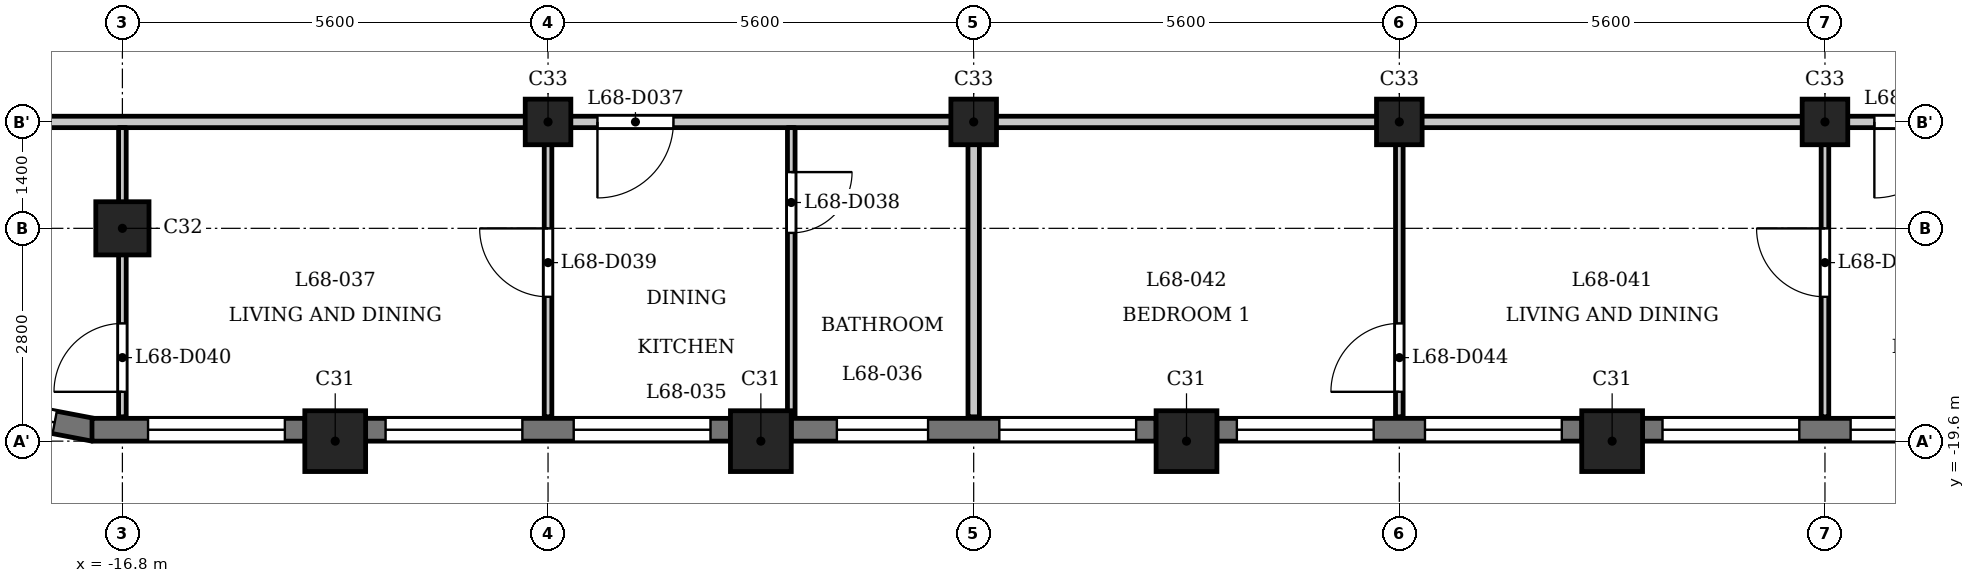
"""IFC4 building model, lengths in metres.
Left out: names, types, materials, properties, quantities, classifications, styles, units other than length and angle.
Written with IfcOpenShell. Run it as: python <this file> out.ifc"""

import sys

from ifc_helpers import new_model, si_unit, direction, frame, frame_2d, origin, origin_2d, place, context, subcontext, project, spatial, rectangle, extrude, element, fill, save


model = new_model("IFC4")
c1 = context("Model", 3, precision=1e-05, world=origin(), true_north=direction((0.0, 1.0)))
c2 = subcontext(c1, "Body", "Model", "MODEL_VIEW")
j1 = project(units=[si_unit("LENGTHUNIT", "METRE"), si_unit("PLANEANGLEUNIT", "RADIAN")], contexts=[c1])
p1 = place(None, origin())
s1 = spatial("IfcSite", under=j1, at=p1, CompositionType="ELEMENT")
p2 = place(p1, origin())
s2 = spatial("IfcBuilding", under=s1, at=p2, CompositionType="ELEMENT")
p3 = place(p2, frame((0.0, 0.0, 262.7)))
s3 = spatial("IfcBuildingStorey", under=s2, at=p3, CompositionType="ELEMENT", Elevation=262.7)
for number, where, z_axis, x_axis in (
    (1, (-14.0, -19.6, 0.0), (0.0, 0.0, 1.0), (1.0, 0.0, 0.0)),
    (2, (-8.4, -19.6, 0.0), (0.0, 0.0, 1.0), (1.0, 0.0, 0.0)),
    (3, (-2.8, -19.6, 0.0), (0.0, 0.0, 1.0), (1.0, 0.0, 0.0)),
    (4, (2.8, -19.6, 0.0), (0.0, 0.0, 1.0), (1.0, 0.0, 0.0)),
):
    element("IfcColumn", number, at=place(p3, frame(where, z_axis=z_axis, x_axis=x_axis)), inside=s3, PredefinedType="COLUMN", context=c2, shape_type="SweptSolid", body=[
        extrude(rectangle(XDim=0.8, YDim=0.8, at=origin_2d()), origin(), (0.0, 0.0, 1.0), 3.5),
    ])
p4 = place(p3, frame((-16.8, -16.8, 0.0), z_axis=(0.0, 0.0, 1.0), x_axis=(1.0, 0.0, 0.0)))
e5 = element("IfcColumn", 5, at=p4, inside=s3, PredefinedType="COLUMN", context=c2, shape_type="SweptSolid", body=[
    extrude(rectangle(XDim=0.7, YDim=0.7, at=origin_2d()), origin(), (0.0, 0.0, 1.0), 3.5),
])
for number, where, z_axis, x_axis in (
    (6, (-11.2, -15.4, 0.0), (0.0, 0.0, 1.0), (1.0, 0.0, 0.0)),
    (7, (-5.6, -15.4, 0.0), (0.0, 0.0, 1.0), (1.0, 0.0, 0.0)),
    (8, (0.0, -15.4, 0.0), (0.0, 0.0, 1.0), (1.0, 0.0, 0.0)),
    (9, (5.6, -15.4, 0.0), (0.0, 0.0, 1.0), (1.0, 0.0, 0.0)),
):
    element("IfcColumn", number, at=place(p3, frame(where, z_axis=z_axis, x_axis=x_axis)), inside=s3, PredefinedType="COLUMN", context=c2, shape_type="SweptSolid", body=[
        extrude(rectangle(XDim=0.6, YDim=0.6, at=origin_2d()), origin(), (0.0, 0.0, 1.0), 3.5),
    ])
p5 = place(p3, frame((-18.995, -19.105, 0.0), z_axis=(0.0, 0.0, 1.0), x_axis=(0.982301706131, -0.187305520826, 0.0)))
e10 = element("IfcWall", 10, at=p5, inside=s3, PredefinedType="SOLIDWALL", context=c2, shape_type="SweptSolid", body=[
    extrude(rectangle(XDim=1.856, YDim=0.3, at=frame_2d((0.928, 0.0))), origin(), (0.0, 0.0, 1.0), 2.55),
])
p6 = place(p5, frame((0.528, 0.0, 0.6)))
e11 = element("IfcOpeningElement", 11, at=p6, cuts=e10, PredefinedType="OPENING", context=c2, shape_type="SweptSolid", body=[
    extrude(rectangle(XDim=0.8, YDim=1.55, at=frame_2d((0.4, 0.775))), frame((0.0, 0.16, 0.0), z_axis=(0.0, -1.0, 0.0), x_axis=(1.0, 0.0, 0.0)), (0.0, 0.0, 1.0), 0.32),
])
p7 = place(p3, frame((-17.2, -19.45, 0.0), z_axis=(0.0, 0.0, 1.0), x_axis=(1.0, 0.0, 0.0)))
e12 = element("IfcWall", 12, at=p7, inside=s3, PredefinedType="SOLIDWALL", context=c2, shape_type="SweptSolid", body=[
    extrude(rectangle(XDim=2.8, YDim=0.3, at=frame_2d((1.4, 0.0))), origin(), (0.0, 0.0, 1.0), 2.55),
])
p8 = place(p7, frame((0.738, 0.0, 0.9)))
e13 = element("IfcOpeningElement", 13, at=p8, cuts=e12, PredefinedType="OPENING", context=c2, shape_type="SweptSolid", body=[
    extrude(rectangle(XDim=1.8, YDim=1.25, at=frame_2d((0.9, 0.625))), frame((0.0, 0.16, 0.0), z_axis=(0.0, -1.0, 0.0), x_axis=(1.0, 0.0, 0.0)), (0.0, 0.0, 1.0), 0.32),
])
p9 = place(p3, frame((-13.6, -19.45, 0.0), z_axis=(0.0, 0.0, 1.0), x_axis=(1.0, 0.0, 0.0)))
e14 = element("IfcWall", 14, at=p9, inside=s3, PredefinedType="SOLIDWALL", context=c2, shape_type="SweptSolid", body=[
    extrude(rectangle(XDim=4.8, YDim=0.3, at=frame_2d((2.4, 0.0))), origin(), (0.0, 0.0, 1.0), 2.55),
])
p10 = place(p9, frame((0.262, 0.0, 0.9)))
e15 = element("IfcOpeningElement", 15, at=p10, cuts=e14, PredefinedType="OPENING", context=c2, shape_type="SweptSolid", body=[
    extrude(rectangle(XDim=1.8, YDim=1.25, at=frame_2d((0.9, 0.625))), frame((0.0, 0.16, 0.0), z_axis=(0.0, -1.0, 0.0), x_axis=(1.0, 0.0, 0.0)), (0.0, 0.0, 1.0), 0.32),
])
p11 = place(p9, frame((2.738, 0.0, 0.9)))
e16 = element("IfcOpeningElement", 16, at=p11, cuts=e14, PredefinedType="OPENING", context=c2, shape_type="SweptSolid", body=[
    extrude(rectangle(XDim=1.8, YDim=1.25, at=frame_2d((0.9, 0.625))), frame((0.0, 0.16, 0.0), z_axis=(0.0, -1.0, 0.0), x_axis=(1.0, 0.0, 0.0)), (0.0, 0.0, 1.0), 0.32),
])
p12 = place(p3, frame((-8.0, -19.45, 0.0), z_axis=(0.0, 0.0, 1.0), x_axis=(1.0, 0.0, 0.0)))
e17 = element("IfcWall", 17, at=p12, inside=s3, PredefinedType="SOLIDWALL", context=c2, shape_type="SweptSolid", body=[
    extrude(rectangle(XDim=4.8, YDim=0.3, at=frame_2d((2.4, 0.0))), origin(), (0.0, 0.0, 1.0), 2.55),
])
p13 = place(p12, frame((0.6, 0.0, 0.6)))
e18 = element("IfcOpeningElement", 18, at=p13, cuts=e17, PredefinedType="OPENING", context=c2, shape_type="SweptSolid", body=[
    extrude(rectangle(XDim=1.2, YDim=1.55, at=frame_2d((0.6, 0.775))), frame((0.0, 0.16, 0.0), z_axis=(0.0, -1.0, 0.0), x_axis=(1.0, 0.0, 0.0)), (0.0, 0.0, 1.0), 0.32),
])
p14 = place(p12, frame((2.738, 0.0, 0.9)))
e19 = element("IfcOpeningElement", 19, at=p14, cuts=e17, PredefinedType="OPENING", context=c2, shape_type="SweptSolid", body=[
    extrude(rectangle(XDim=1.8, YDim=1.25, at=frame_2d((0.9, 0.625))), frame((0.0, 0.16, 0.0), z_axis=(0.0, -1.0, 0.0), x_axis=(1.0, 0.0, 0.0)), (0.0, 0.0, 1.0), 0.32),
])
p15 = place(p3, frame((-2.4, -19.45, 0.0), z_axis=(0.0, 0.0, 1.0), x_axis=(1.0, 0.0, 0.0)))
e20 = element("IfcWall", 20, at=p15, inside=s3, PredefinedType="SOLIDWALL", context=c2, shape_type="SweptSolid", body=[
    extrude(rectangle(XDim=4.8, YDim=0.3, at=frame_2d((2.4, 0.0))), origin(), (0.0, 0.0, 1.0), 2.55),
])
p16 = place(p15, frame((0.262, 0.0, 0.9)))
e21 = element("IfcOpeningElement", 21, at=p16, cuts=e20, PredefinedType="OPENING", context=c2, shape_type="SweptSolid", body=[
    extrude(rectangle(XDim=1.8, YDim=1.25, at=frame_2d((0.9, 0.625))), frame((0.0, 0.16, 0.0), z_axis=(0.0, -1.0, 0.0), x_axis=(1.0, 0.0, 0.0)), (0.0, 0.0, 1.0), 0.32),
])
p17 = place(p15, frame((2.738, 0.0, 0.9)))
e22 = element("IfcOpeningElement", 22, at=p17, cuts=e20, PredefinedType="OPENING", context=c2, shape_type="SweptSolid", body=[
    extrude(rectangle(XDim=1.8, YDim=1.25, at=frame_2d((0.9, 0.625))), frame((0.0, 0.16, 0.0), z_axis=(0.0, -1.0, 0.0), x_axis=(1.0, 0.0, 0.0)), (0.0, 0.0, 1.0), 0.32),
])
p18 = place(p3, frame((3.2, -19.45, 0.0), z_axis=(0.0, 0.0, 1.0), x_axis=(1.0, 0.0, 0.0)))
e23 = element("IfcWall", 23, at=p18, inside=s3, PredefinedType="SOLIDWALL", context=c2, shape_type="SweptSolid", body=[
    extrude(rectangle(XDim=4.8, YDim=0.3, at=frame_2d((2.4, 0.0))), origin(), (0.0, 0.0, 1.0), 2.55),
])
p19 = place(p18, frame((0.262, 0.0, 0.9)))
e24 = element("IfcOpeningElement", 24, at=p19, cuts=e23, PredefinedType="OPENING", context=c2, shape_type="SweptSolid", body=[
    extrude(rectangle(XDim=1.8, YDim=1.25, at=frame_2d((0.9, 0.625))), frame((0.0, 0.16, 0.0), z_axis=(0.0, -1.0, 0.0), x_axis=(1.0, 0.0, 0.0)), (0.0, 0.0, 1.0), 0.32),
])
p20 = place(p18, frame((2.738, 0.0, 0.9)))
e25 = element("IfcOpeningElement", 25, at=p20, cuts=e23, PredefinedType="OPENING", context=c2, shape_type="SweptSolid", body=[
    extrude(rectangle(XDim=1.8, YDim=1.25, at=frame_2d((0.9, 0.625))), frame((0.0, 0.16, 0.0), z_axis=(0.0, -1.0, 0.0), x_axis=(1.0, 0.0, 0.0)), (0.0, 0.0, 1.0), 0.32),
])
p21 = place(p3, frame((-23.322, -15.4, 0.0), z_axis=(0.0, 0.0, 1.0), x_axis=(1.0, 0.0, 0.0)))
e26 = element("IfcWall", 26, at=p21, inside=s3, PredefinedType="PARTITIONING", context=c2, shape_type="SweptSolid", body=[
    extrude(rectangle(XDim=46.872, YDim=0.15, at=frame_2d((23.436, 0.0))), origin(), (0.0, 0.0, 1.0), 3.2),
])
p22 = place(p21, frame((12.772, 0.0, 0.0)))
e27 = element("IfcOpeningElement", 27, at=p22, cuts=e26, PredefinedType="OPENING", context=c2, shape_type="SweptSolid", body=[
    extrude(rectangle(XDim=1.0, YDim=2.1, at=frame_2d((0.5, 1.05))), frame((0.0, 0.085, 0.0), z_axis=(0.0, -1.0, 0.0), x_axis=(1.0, 0.0, 0.0)), (0.0, 0.0, 1.0), 0.17),
])
p23 = place(p21, frame((29.572, 0.0, 0.0)))
e28 = element("IfcOpeningElement", 28, at=p23, cuts=e26, PredefinedType="OPENING", context=c2, shape_type="SweptSolid", body=[
    extrude(rectangle(XDim=1.0, YDim=2.1, at=frame_2d((0.5, 1.05))), frame((0.0, 0.085, 0.0), z_axis=(0.0, -1.0, 0.0), x_axis=(1.0, 0.0, 0.0)), (0.0, 0.0, 1.0), 0.17),
])
p24 = place(p21, frame((37.572, 0.0, 0.0)))
e29 = element("IfcOpeningElement", 29, at=p24, cuts=e26, PredefinedType="OPENING", context=c2, shape_type="SweptSolid", body=[
    extrude(rectangle(XDim=1.0, YDim=2.1, at=frame_2d((0.5, 1.05))), frame((0.0, 0.085, 0.0), z_axis=(0.0, -1.0, 0.0), x_axis=(1.0, 0.0, 0.0)), (0.0, 0.0, 1.0), 0.17),
])
p25 = place(p3, frame((-16.8, -19.28, 0.0), z_axis=(0.0, 0.0, 1.0), x_axis=(0.0, 1.0, 0.0)))
e30 = element("IfcWall", 30, at=p25, inside=s3, PredefinedType="PARTITIONING", context=c2, shape_type="SweptSolid", body=[
    extrude(rectangle(XDim=3.805, YDim=0.1, at=frame_2d((1.902, 0.0))), origin(), (0.0, 0.0, 1.0), 3.2),
])
p26 = place(p25, frame((0.329, 0.0, 0.0)))
e31 = element("IfcOpeningElement", 31, at=p26, cuts=e30, PredefinedType="OPENING", context=c2, shape_type="SweptSolid", body=[
    extrude(rectangle(XDim=0.9, YDim=2.1, at=frame_2d((0.45, 1.05))), frame((0.0, 0.06, 0.0), z_axis=(0.0, -1.0, 0.0), x_axis=(1.0, 0.0, 0.0)), (0.0, 0.0, 1.0), 0.12),
])
p27 = place(p3, frame((-11.2, -19.28, 0.0), z_axis=(0.0, 0.0, 1.0), x_axis=(0.0, 1.0, 0.0)))
e32 = element("IfcWall", 32, at=p27, inside=s3, PredefinedType="PARTITIONING", context=c2, shape_type="SweptSolid", body=[
    extrude(rectangle(XDim=3.805, YDim=0.1, at=frame_2d((1.902, 0.0))), origin(), (0.0, 0.0, 1.0), 3.2),
])
p28 = place(p27, frame((1.579, 0.0, 0.0)))
e33 = element("IfcOpeningElement", 33, at=p28, cuts=e32, PredefinedType="OPENING", context=c2, shape_type="SweptSolid", body=[
    extrude(rectangle(XDim=0.9, YDim=2.1, at=frame_2d((0.45, 1.05))), frame((0.0, 0.06, 0.0), z_axis=(0.0, -1.0, 0.0), x_axis=(1.0, 0.0, 0.0)), (0.0, 0.0, 1.0), 0.12),
])
p29 = place(p3, frame((-8.0, -19.28, 0.0), z_axis=(0.0, 0.0, 1.0), x_axis=(0.0, 1.0, 0.0)))
e34 = element("IfcWall", 34, at=p29, inside=s3, PredefinedType="PARTITIONING", context=c2, shape_type="SweptSolid", body=[
    extrude(rectangle(XDim=3.805, YDim=0.1, at=frame_2d((1.902, 0.0))), origin(), (0.0, 0.0, 1.0), 3.2),
])
p30 = place(p29, frame((2.42, 0.0, 0.0)))
e35 = element("IfcOpeningElement", 35, at=p30, cuts=e34, PredefinedType="OPENING", context=c2, shape_type="SweptSolid", body=[
    extrude(rectangle(XDim=0.8, YDim=2.1, at=frame_2d((0.4, 1.05))), frame((0.0, 0.06, 0.0), z_axis=(0.0, -1.0, 0.0), x_axis=(1.0, 0.0, 0.0)), (0.0, 0.0, 1.0), 0.12),
])
p31 = place(p3, frame((-5.6, -19.28, 0.0), z_axis=(0.0, 0.0, 1.0), x_axis=(0.0, 1.0, 0.0)))
e36 = element("IfcWall", 36, at=p31, inside=s3, PredefinedType="PARTITIONING", context=c2, shape_type="SweptSolid", body=[
    extrude(rectangle(XDim=3.805, YDim=0.15, at=frame_2d((1.902, 0.0))), origin(), (0.0, 0.0, 1.0), 3.2),
])
p32 = place(p3, frame((0.0, -19.28, 0.0), z_axis=(0.0, 0.0, 1.0), x_axis=(0.0, 1.0, 0.0)))
e37 = element("IfcWall", 37, at=p32, inside=s3, PredefinedType="PARTITIONING", context=c2, shape_type="SweptSolid", body=[
    extrude(rectangle(XDim=3.805, YDim=0.1, at=frame_2d((1.902, 0.0))), origin(), (0.0, 0.0, 1.0), 3.2),
])
p33 = place(p32, frame((0.329, 0.0, 0.0)))
e38 = element("IfcOpeningElement", 38, at=p33, cuts=e37, PredefinedType="OPENING", context=c2, shape_type="SweptSolid", body=[
    extrude(rectangle(XDim=0.9, YDim=2.1, at=frame_2d((0.45, 1.05))), frame((0.0, 0.06, 0.0), z_axis=(0.0, -1.0, 0.0), x_axis=(1.0, 0.0, 0.0)), (0.0, 0.0, 1.0), 0.12),
])
p34 = place(p3, frame((5.6, -19.28, 0.0), z_axis=(0.0, 0.0, 1.0), x_axis=(0.0, 1.0, 0.0)))
e39 = element("IfcWall", 39, at=p34, inside=s3, PredefinedType="PARTITIONING", context=c2, shape_type="SweptSolid", body=[
    extrude(rectangle(XDim=3.805, YDim=0.1, at=frame_2d((1.902, 0.0))), origin(), (0.0, 0.0, 1.0), 3.2),
])
p35 = place(p34, frame((1.579, 0.0, 0.0)))
e40 = element("IfcOpeningElement", 40, at=p35, cuts=e39, PredefinedType="OPENING", context=c2, shape_type="SweptSolid", body=[
    extrude(rectangle(XDim=0.9, YDim=2.1, at=frame_2d((0.45, 1.05))), frame((0.0, 0.06, 0.0), z_axis=(0.0, -1.0, 0.0), x_axis=(1.0, 0.0, 0.0)), (0.0, 0.0, 1.0), 0.12),
])
p36 = place(p22, origin())
e41 = element("IfcDoor", 41, at=p36, inside=s3, OperationType="SINGLE_SWING_LEFT", PredefinedType="DOOR", context=c2, shape_type="SweptSolid", body=[
    extrude(rectangle(XDim=1.0, YDim=2.1, at=frame_2d((0.5, 1.05))), frame((0.0, 0.025, 0.0), z_axis=(0.0, -1.0, 0.0), x_axis=(1.0, 0.0, 0.0)), (0.0, 0.0, 1.0), 0.05),
])
fill(e27, e41)
p37 = place(p30, origin())
e42 = element("IfcDoor", 42, at=p37, inside=s3, OperationType="SINGLE_SWING_RIGHT", PredefinedType="DOOR", context=c2, shape_type="SweptSolid", body=[
    extrude(rectangle(XDim=0.8, YDim=2.1, at=frame_2d((0.4, 1.05))), frame((0.0, 0.025, 0.0), z_axis=(0.0, -1.0, 0.0), x_axis=(1.0, 0.0, 0.0)), (0.0, 0.0, 1.0), 0.05),
])
fill(e35, e42)
p38 = place(p28, origin())
e43 = element("IfcDoor", 43, at=p38, inside=s3, OperationType="SINGLE_SWING_LEFT", PredefinedType="DOOR", context=c2, shape_type="SweptSolid", body=[
    extrude(rectangle(XDim=0.9, YDim=2.1, at=frame_2d((0.45, 1.05))), frame((0.0, 0.025, 0.0), z_axis=(0.0, -1.0, 0.0), x_axis=(1.0, 0.0, 0.0)), (0.0, 0.0, 1.0), 0.05),
])
fill(e33, e43)
p39 = place(p26, origin())
e44 = element("IfcDoor", 44, at=p39, inside=s3, OperationType="SINGLE_SWING_RIGHT", PredefinedType="DOOR", context=c2, shape_type="SweptSolid", body=[
    extrude(rectangle(XDim=0.9, YDim=2.1, at=frame_2d((0.45, 1.05))), frame((0.0, 0.025, 0.0), z_axis=(0.0, -1.0, 0.0), x_axis=(1.0, 0.0, 0.0)), (0.0, 0.0, 1.0), 0.05),
])
fill(e31, e44)
p40 = place(p23, origin())
e45 = element("IfcDoor", 45, at=p40, inside=s3, OperationType="SINGLE_SWING_LEFT", PredefinedType="DOOR", context=c2, shape_type="SweptSolid", body=[
    extrude(rectangle(XDim=1.0, YDim=2.1, at=frame_2d((0.5, 1.05))), frame((0.0, 0.025, 0.0), z_axis=(0.0, -1.0, 0.0), x_axis=(1.0, 0.0, 0.0)), (0.0, 0.0, 1.0), 0.05),
])
fill(e28, e45)
p41 = place(p35, origin())
e46 = element("IfcDoor", 46, at=p41, inside=s3, OperationType="SINGLE_SWING_LEFT", PredefinedType="DOOR", context=c2, shape_type="SweptSolid", body=[
    extrude(rectangle(XDim=0.9, YDim=2.1, at=frame_2d((0.45, 1.05))), frame((0.0, 0.025, 0.0), z_axis=(0.0, -1.0, 0.0), x_axis=(1.0, 0.0, 0.0)), (0.0, 0.0, 1.0), 0.05),
])
fill(e40, e46)
p42 = place(p33, origin())
e47 = element("IfcDoor", 47, at=p42, inside=s3, OperationType="SINGLE_SWING_RIGHT", PredefinedType="DOOR", context=c2, shape_type="SweptSolid", body=[
    extrude(rectangle(XDim=0.9, YDim=2.1, at=frame_2d((0.45, 1.05))), frame((0.0, 0.025, 0.0), z_axis=(0.0, -1.0, 0.0), x_axis=(1.0, 0.0, 0.0)), (0.0, 0.0, 1.0), 0.05),
])
fill(e38, e47)
p43 = place(p6, origin())
e48 = element("IfcWindow", 48, at=p43, inside=s3, PartitioningType="SINGLE_PANEL", PredefinedType="WINDOW", context=c2, shape_type="SweptSolid", body=[
    extrude(rectangle(XDim=0.8, YDim=1.55, at=frame_2d((0.4, 0.775))), frame((0.0, 0.03, 0.0), z_axis=(0.0, -1.0, 0.0), x_axis=(1.0, 0.0, 0.0)), (0.0, 0.0, 1.0), 0.06),
])
fill(e11, e48)
p44 = place(p8, origin())
e49 = element("IfcWindow", 49, at=p44, inside=s3, PartitioningType="SINGLE_PANEL", PredefinedType="WINDOW", context=c2, shape_type="SweptSolid", body=[
    extrude(rectangle(XDim=1.8, YDim=1.25, at=frame_2d((0.9, 0.625))), frame((0.0, 0.03, 0.0), z_axis=(0.0, -1.0, 0.0), x_axis=(1.0, 0.0, 0.0)), (0.0, 0.0, 1.0), 0.06),
])
fill(e13, e49)
p45 = place(p10, origin())
e50 = element("IfcWindow", 50, at=p45, inside=s3, PartitioningType="SINGLE_PANEL", PredefinedType="WINDOW", context=c2, shape_type="SweptSolid", body=[
    extrude(rectangle(XDim=1.8, YDim=1.25, at=frame_2d((0.9, 0.625))), frame((0.0, 0.03, 0.0), z_axis=(0.0, -1.0, 0.0), x_axis=(1.0, 0.0, 0.0)), (0.0, 0.0, 1.0), 0.06),
])
fill(e15, e50)
p46 = place(p11, origin())
e51 = element("IfcWindow", 51, at=p46, inside=s3, PartitioningType="SINGLE_PANEL", PredefinedType="WINDOW", context=c2, shape_type="SweptSolid", body=[
    extrude(rectangle(XDim=1.8, YDim=1.25, at=frame_2d((0.9, 0.625))), frame((0.0, 0.03, 0.0), z_axis=(0.0, -1.0, 0.0), x_axis=(1.0, 0.0, 0.0)), (0.0, 0.0, 1.0), 0.06),
])
fill(e16, e51)
p47 = place(p13, origin())
e52 = element("IfcWindow", 52, at=p47, inside=s3, PartitioningType="SINGLE_PANEL", PredefinedType="WINDOW", context=c2, shape_type="SweptSolid", body=[
    extrude(rectangle(XDim=1.2, YDim=1.55, at=frame_2d((0.6, 0.775))), frame((0.0, 0.03, 0.0), z_axis=(0.0, -1.0, 0.0), x_axis=(1.0, 0.0, 0.0)), (0.0, 0.0, 1.0), 0.06),
])
fill(e18, e52)
p48 = place(p14, origin())
e53 = element("IfcWindow", 53, at=p48, inside=s3, PartitioningType="SINGLE_PANEL", PredefinedType="WINDOW", context=c2, shape_type="SweptSolid", body=[
    extrude(rectangle(XDim=1.8, YDim=1.25, at=frame_2d((0.9, 0.625))), frame((0.0, 0.03, 0.0), z_axis=(0.0, -1.0, 0.0), x_axis=(1.0, 0.0, 0.0)), (0.0, 0.0, 1.0), 0.06),
])
fill(e19, e53)
p49 = place(p16, origin())
e54 = element("IfcWindow", 54, at=p49, inside=s3, PartitioningType="SINGLE_PANEL", PredefinedType="WINDOW", context=c2, shape_type="SweptSolid", body=[
    extrude(rectangle(XDim=1.8, YDim=1.25, at=frame_2d((0.9, 0.625))), frame((0.0, 0.03, 0.0), z_axis=(0.0, -1.0, 0.0), x_axis=(1.0, 0.0, 0.0)), (0.0, 0.0, 1.0), 0.06),
])
fill(e21, e54)
p50 = place(p17, origin())
e55 = element("IfcWindow", 55, at=p50, inside=s3, PartitioningType="SINGLE_PANEL", PredefinedType="WINDOW", context=c2, shape_type="SweptSolid", body=[
    extrude(rectangle(XDim=1.8, YDim=1.25, at=frame_2d((0.9, 0.625))), frame((0.0, 0.03, 0.0), z_axis=(0.0, -1.0, 0.0), x_axis=(1.0, 0.0, 0.0)), (0.0, 0.0, 1.0), 0.06),
])
fill(e22, e55)
p51 = place(p19, origin())
e56 = element("IfcWindow", 56, at=p51, inside=s3, PartitioningType="SINGLE_PANEL", PredefinedType="WINDOW", context=c2, shape_type="SweptSolid", body=[
    extrude(rectangle(XDim=1.8, YDim=1.25, at=frame_2d((0.9, 0.625))), frame((0.0, 0.03, 0.0), z_axis=(0.0, -1.0, 0.0), x_axis=(1.0, 0.0, 0.0)), (0.0, 0.0, 1.0), 0.06),
])
fill(e24, e56)
p52 = place(p20, origin())
e57 = element("IfcWindow", 57, at=p52, inside=s3, PartitioningType="SINGLE_PANEL", PredefinedType="WINDOW", context=c2, shape_type="SweptSolid", body=[
    extrude(rectangle(XDim=1.8, YDim=1.25, at=frame_2d((0.9, 0.625))), frame((0.0, 0.03, 0.0), z_axis=(0.0, -1.0, 0.0), x_axis=(1.0, 0.0, 0.0)), (0.0, 0.0, 1.0), 0.06),
])
fill(e25, e57)
save(model, sys.argv[1])
